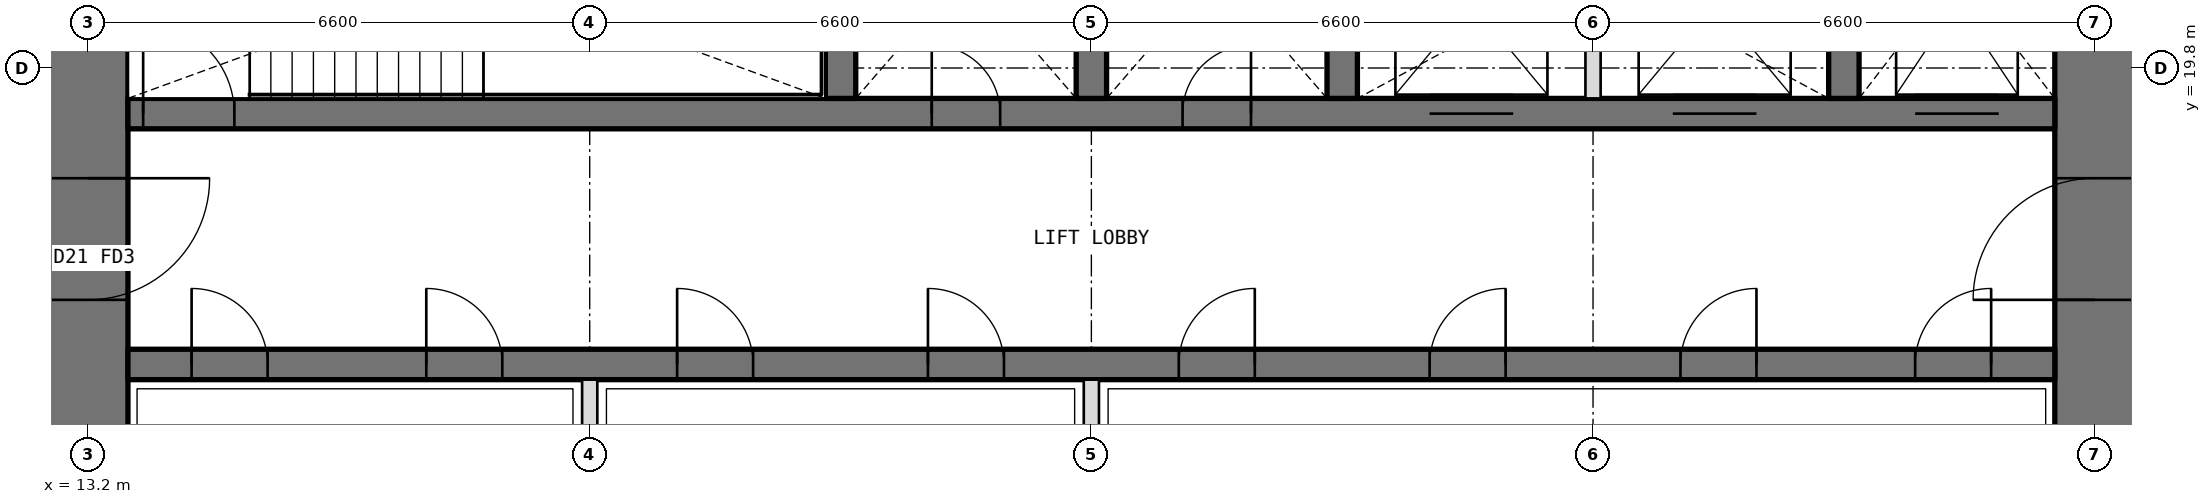
"""IFC4 building model, lengths in metres.
Left out: names, types, materials, properties, quantities, classifications, styles, units other than length and angle.
Written with IfcOpenShell. Run it as: python <this file> out.ifc"""

import sys

from ifc_helpers import new_model, si_unit, direction, frame, frame_2d, origin, place, context, subcontext, project, spatial, rectangle, extrude, element, fill, save


model = new_model("IFC4")
c1 = context("Model", 3, precision=1e-05, world=origin(), true_north=direction((0.0, 1.0)))
c2 = subcontext(c1, "Body", "Model", "MODEL_VIEW")
j1 = project(units=[si_unit("LENGTHUNIT", "METRE"), si_unit("PLANEANGLEUNIT", "RADIAN")], contexts=[c1])
p1 = place(None, origin())
s1 = spatial("IfcSite", under=j1, at=p1, CompositionType="ELEMENT")
p2 = place(p1, origin())
s2 = spatial("IfcBuilding", under=s1, at=p2, CompositionType="ELEMENT")
p3 = place(p2, frame((0.0, 0.0, 283.8)))
s3 = spatial("IfcBuildingStorey", under=s2, at=p3, CompositionType="ELEMENT", Elevation=283.8)
p4 = place(p3, frame((39.6, 13.725, 0.0), z_axis=(0.0, 0.0, 1.0), x_axis=(0.0, 1.0, 0.0)))
e1 = element("IfcWall", 1, at=p4, inside=s3, PredefinedType="SHEAR", context=c2, shape_type="SweptSolid", body=[
    extrude(rectangle(XDim=18.75, YDim=1.05, at=frame_2d((9.375, 0.0))), origin(), (0.0, 0.0, 1.0), 4.2),
])
p5 = place(p4, frame((3.025, 0.0, 0.0)))
e2 = element("IfcOpeningElement", 2, at=p5, cuts=e1, PredefinedType="OPENING", context=c2, shape_type="SweptSolid", body=[
    extrude(rectangle(XDim=1.6, YDim=2.1, at=frame_2d((0.8, 1.05))), frame((0.0, 0.535, 0.0), z_axis=(0.0, -1.0, 0.0), x_axis=(1.0, 0.0, 0.0)), (0.0, 0.0, 1.0), 1.07),
])
p6 = place(p4, frame((13.825, 0.0, 0.0)))
e3 = element("IfcOpeningElement", 3, at=p6, cuts=e1, PredefinedType="OPENING", context=c2, shape_type="SweptSolid", body=[
    extrude(rectangle(XDim=1.6, YDim=2.1, at=frame_2d((0.8, 1.05))), frame((0.0, 0.535, 0.0), z_axis=(0.0, -1.0, 0.0), x_axis=(1.0, 0.0, 0.0)), (0.0, 0.0, 1.0), 1.07),
])
p7 = place(p3, frame((13.2, 32.475, 0.0), z_axis=(0.0, 0.0, 1.0), x_axis=(0.0, -1.0, 0.0)))
e4 = element("IfcWall", 4, at=p7, inside=s3, PredefinedType="SHEAR", context=c2, shape_type="SweptSolid", body=[
    extrude(rectangle(XDim=18.75, YDim=1.05, at=frame_2d((9.375, 0.0))), origin(), (0.0, 0.0, 1.0), 4.2),
])
p8 = place(p7, frame((14.125, 0.0, 0.0)))
e5 = element("IfcOpeningElement", 5, at=p8, cuts=e4, PredefinedType="OPENING", context=c2, shape_type="SweptSolid", body=[
    extrude(rectangle(XDim=1.6, YDim=2.1, at=frame_2d((0.8, 1.05))), frame((0.0, 0.535, 0.0), z_axis=(0.0, -1.0, 0.0), x_axis=(1.0, 0.0, 0.0)), (0.0, 0.0, 1.0), 1.07),
])
p9 = place(p7, frame((3.325, 0.0, 0.0)))
e6 = element("IfcOpeningElement", 6, at=p9, cuts=e4, PredefinedType="OPENING", context=c2, shape_type="SweptSolid", body=[
    extrude(rectangle(XDim=1.6, YDim=2.1, at=frame_2d((0.8, 1.05))), frame((0.0, 0.535, 0.0), z_axis=(0.0, -1.0, 0.0), x_axis=(1.0, 0.0, 0.0)), (0.0, 0.0, 1.0), 1.07),
])
p10 = place(p3, frame((13.725, 15.9, 0.0), z_axis=(0.0, 0.0, 1.0), x_axis=(1.0, 0.0, 0.0)))
e7 = element("IfcWall", 7, at=p10, inside=s3, PredefinedType="SHEAR", context=c2, shape_type="SweptSolid", body=[
    extrude(rectangle(XDim=25.35, YDim=0.4, at=frame_2d((12.675, 0.0))), origin(), (0.0, 0.0, 1.0), 4.2),
])
p11 = place(p10, frame((0.837, 0.0, 0.0)))
e8 = element("IfcOpeningElement", 8, at=p11, cuts=e7, PredefinedType="OPENING", context=c2, shape_type="SweptSolid", body=[
    extrude(rectangle(XDim=1.0, YDim=2.1, at=frame_2d((0.5, 1.05))), frame((0.0, 0.21, 0.0), z_axis=(0.0, -1.0, 0.0), x_axis=(1.0, 0.0, 0.0)), (0.0, 0.0, 1.0), 0.42),
])
p12 = place(p10, frame((3.925, 0.0, 0.0)))
e9 = element("IfcOpeningElement", 9, at=p12, cuts=e7, PredefinedType="OPENING", context=c2, shape_type="SweptSolid", body=[
    extrude(rectangle(XDim=1.0, YDim=2.1, at=frame_2d((0.5, 1.05))), frame((0.0, 0.21, 0.0), z_axis=(0.0, -1.0, 0.0), x_axis=(1.0, 0.0, 0.0)), (0.0, 0.0, 1.0), 0.42),
])
p13 = place(p10, frame((7.225, 0.0, 0.0)))
e10 = element("IfcOpeningElement", 10, at=p13, cuts=e7, PredefinedType="OPENING", context=c2, shape_type="SweptSolid", body=[
    extrude(rectangle(XDim=1.0, YDim=2.1, at=frame_2d((0.5, 1.05))), frame((0.0, 0.21, 0.0), z_axis=(0.0, -1.0, 0.0), x_axis=(1.0, 0.0, 0.0)), (0.0, 0.0, 1.0), 0.42),
])
p14 = place(p10, frame((10.525, 0.0, 0.0)))
e11 = element("IfcOpeningElement", 11, at=p14, cuts=e7, PredefinedType="OPENING", context=c2, shape_type="SweptSolid", body=[
    extrude(rectangle(XDim=1.0, YDim=2.1, at=frame_2d((0.5, 1.05))), frame((0.0, 0.21, 0.0), z_axis=(0.0, -1.0, 0.0), x_axis=(1.0, 0.0, 0.0)), (0.0, 0.0, 1.0), 0.42),
])
p15 = place(p10, frame((13.825, 0.0, 0.0)))
e12 = element("IfcOpeningElement", 12, at=p15, cuts=e7, PredefinedType="OPENING", context=c2, shape_type="SweptSolid", body=[
    extrude(rectangle(XDim=1.0, YDim=2.1, at=frame_2d((0.5, 1.05))), frame((0.0, 0.21, 0.0), z_axis=(0.0, -1.0, 0.0), x_axis=(1.0, 0.0, 0.0)), (0.0, 0.0, 1.0), 0.42),
])
p16 = place(p10, frame((17.125, 0.0, 0.0)))
e13 = element("IfcOpeningElement", 13, at=p16, cuts=e7, PredefinedType="OPENING", context=c2, shape_type="SweptSolid", body=[
    extrude(rectangle(XDim=1.0, YDim=2.1, at=frame_2d((0.5, 1.05))), frame((0.0, 0.21, 0.0), z_axis=(0.0, -1.0, 0.0), x_axis=(1.0, 0.0, 0.0)), (0.0, 0.0, 1.0), 0.42),
])
p17 = place(p10, frame((20.425, 0.0, 0.0)))
e14 = element("IfcOpeningElement", 14, at=p17, cuts=e7, PredefinedType="OPENING", context=c2, shape_type="SweptSolid", body=[
    extrude(rectangle(XDim=1.0, YDim=2.1, at=frame_2d((0.5, 1.05))), frame((0.0, 0.21, 0.0), z_axis=(0.0, -1.0, 0.0), x_axis=(1.0, 0.0, 0.0)), (0.0, 0.0, 1.0), 0.42),
])
p18 = place(p10, frame((23.512, 0.0, 0.0)))
e15 = element("IfcOpeningElement", 15, at=p18, cuts=e7, PredefinedType="OPENING", context=c2, shape_type="SweptSolid", body=[
    extrude(rectangle(XDim=1.0, YDim=2.1, at=frame_2d((0.5, 1.05))), frame((0.0, 0.21, 0.0), z_axis=(0.0, -1.0, 0.0), x_axis=(1.0, 0.0, 0.0)), (0.0, 0.0, 1.0), 0.42),
])
p19 = place(p3, frame((13.725, 19.2, 0.0), z_axis=(0.0, 0.0, 1.0), x_axis=(1.0, 0.0, 0.0)))
e16 = element("IfcWall", 16, at=p19, inside=s3, PredefinedType="SHEAR", context=c2, shape_type="SweptSolid", body=[
    extrude(rectangle(XDim=25.35, YDim=0.4, at=frame_2d((12.675, 0.0))), origin(), (0.0, 0.0, 1.0), 4.2),
])
p20 = place(p19, frame((10.575, 0.0, 0.0)))
e17 = element("IfcOpeningElement", 17, at=p20, cuts=e16, PredefinedType="OPENING", context=c2, shape_type="SweptSolid", body=[
    extrude(rectangle(XDim=0.9, YDim=2.1, at=frame_2d((0.45, 1.05))), frame((0.0, 0.21, 0.0), z_axis=(0.0, -1.0, 0.0), x_axis=(1.0, 0.0, 0.0)), (0.0, 0.0, 1.0), 0.42),
])
p21 = place(p19, frame((13.875, 0.0, 0.0)))
e18 = element("IfcOpeningElement", 18, at=p21, cuts=e16, PredefinedType="OPENING", context=c2, shape_type="SweptSolid", body=[
    extrude(rectangle(XDim=0.9, YDim=2.1, at=frame_2d((0.45, 1.05))), frame((0.0, 0.21, 0.0), z_axis=(0.0, -1.0, 0.0), x_axis=(1.0, 0.0, 0.0)), (0.0, 0.0, 1.0), 0.42),
])
p22 = place(p19, frame((0.2, 0.0, 0.0)))
e19 = element("IfcOpeningElement", 19, at=p22, cuts=e16, PredefinedType="OPENING", context=c2, shape_type="SweptSolid", body=[
    extrude(rectangle(XDim=1.2, YDim=2.1, at=frame_2d((0.6, 1.05))), frame((0.0, 0.21, 0.0), z_axis=(0.0, -1.0, 0.0), x_axis=(1.0, 0.0, 0.0)), (0.0, 0.0, 1.0), 0.42),
])
p23 = place(p19, frame((23.512, 0.0, 0.0)))
e20 = element("IfcOpeningElement", 20, at=p23, cuts=e16, PredefinedType="OPENING", context=c2, shape_type="SweptSolid", body=[
    extrude(rectangle(XDim=1.1, YDim=2.1, at=frame_2d((0.55, 1.05))), frame((0.0, 0.21, 0.0), z_axis=(0.0, -1.0, 0.0), x_axis=(1.0, 0.0, 0.0)), (0.0, 0.0, 1.0), 0.42),
])
p24 = place(p19, frame((17.125, 0.0, 0.0)))
e21 = element("IfcOpeningElement", 21, at=p24, cuts=e16, PredefinedType="OPENING", context=c2, shape_type="SweptSolid", body=[
    extrude(rectangle(XDim=1.1, YDim=2.1, at=frame_2d((0.55, 1.05))), frame((0.0, 0.21, 0.0), z_axis=(0.0, -1.0, 0.0), x_axis=(1.0, 0.0, 0.0)), (0.0, 0.0, 1.0), 0.42),
])
p25 = place(p19, frame((20.325, 0.0, 0.0)))
e22 = element("IfcOpeningElement", 22, at=p25, cuts=e16, PredefinedType="OPENING", context=c2, shape_type="SweptSolid", body=[
    extrude(rectangle(XDim=1.1, YDim=2.1, at=frame_2d((0.55, 1.05))), frame((0.0, 0.21, 0.0), z_axis=(0.0, -1.0, 0.0), x_axis=(1.0, 0.0, 0.0)), (0.0, 0.0, 1.0), 0.42),
])
for number, where, z_axis, x_axis in (
    (23, (23.1, 19.4, 0.0), (0.0, 0.0, 1.0), (0.0, 1.0, 0.0)),
    (24, (26.4, 19.4, 0.0), (0.0, 0.0, 1.0), (0.0, 1.0, 0.0)),
    (25, (29.7, 19.4, 0.0), (0.0, 0.0, 1.0), (0.0, 1.0, 0.0)),
    (26, (36.3, 19.4, 0.0), (0.0, 0.0, 1.0), (0.0, 1.0, 0.0)),
):
    element("IfcWall", number, at=place(p3, frame(where, z_axis=z_axis, x_axis=x_axis)), inside=s3, PredefinedType="SHEAR", context=c2, shape_type="SweptSolid", body=[
        extrude(rectangle(XDim=3.35, YDim=0.4, at=frame_2d((1.675, 0.0))), origin(), (0.0, 0.0, 1.0), 4.2),
    ])
for number, where, z_axis, x_axis in (
    (27, (19.8, 13.725, 0.0), (0.0, 0.0, 1.0), (0.0, 1.0, 0.0)),
    (28, (26.4, 13.725, 0.0), (0.0, 0.0, 1.0), (0.0, 1.0, 0.0)),
):
    element("IfcWall", number, at=place(p3, frame(where, z_axis=z_axis, x_axis=x_axis)), inside=s3, PredefinedType="PARTITIONING", context=c2, shape_type="SweptSolid", body=[
        extrude(rectangle(XDim=1.975, YDim=0.2, at=frame_2d((0.987, 0.0))), origin(), (0.0, 0.0, 1.0), 4.2),
    ])
p26 = place(p3, frame((33.0, 19.4, 0.0), z_axis=(0.0, 0.0, 1.0), x_axis=(0.0, 1.0, 0.0)))
e29 = element("IfcWall", 29, at=p26, inside=s3, PredefinedType="PARTITIONING", context=c2, shape_type="SweptSolid", body=[
    extrude(rectangle(XDim=3.35, YDim=0.2, at=frame_2d((1.675, 0.0))), origin(), (0.0, 0.0, 1.0), 4.2),
])
p27 = place(p20, origin())
e30 = element("IfcDoor", 30, at=p27, inside=s3, OperationType="SINGLE_SWING_LEFT", PredefinedType="DOOR", context=c2, shape_type="SweptSolid", body=[
    extrude(rectangle(XDim=0.9, YDim=2.1, at=frame_2d((0.45, 1.05))), frame((0.0, 0.025, 0.0), z_axis=(0.0, -1.0, 0.0), x_axis=(1.0, 0.0, 0.0)), (0.0, 0.0, 1.0), 0.05),
])
fill(e17, e30)
p28 = place(p21, origin())
e31 = element("IfcDoor", 31, at=p28, inside=s3, OperationType="SINGLE_SWING_RIGHT", PredefinedType="DOOR", context=c2, shape_type="SweptSolid", body=[
    extrude(rectangle(XDim=0.9, YDim=2.1, at=frame_2d((0.45, 1.05))), frame((0.0, 0.025, 0.0), z_axis=(0.0, -1.0, 0.0), x_axis=(1.0, 0.0, 0.0)), (0.0, 0.0, 1.0), 0.05),
])
fill(e18, e31)
p29 = place(p11, origin())
e32 = element("IfcDoor", 32, at=p29, inside=s3, OperationType="SINGLE_SWING_LEFT", PredefinedType="DOOR", context=c2, shape_type="SweptSolid", body=[
    extrude(rectangle(XDim=1.0, YDim=2.1, at=frame_2d((0.5, 1.05))), frame((0.0, 0.025, 0.0), z_axis=(0.0, -1.0, 0.0), x_axis=(1.0, 0.0, 0.0)), (0.0, 0.0, 1.0), 0.05),
])
fill(e8, e32)
p30 = place(p12, origin())
e33 = element("IfcDoor", 33, at=p30, inside=s3, OperationType="SINGLE_SWING_LEFT", PredefinedType="DOOR", context=c2, shape_type="SweptSolid", body=[
    extrude(rectangle(XDim=1.0, YDim=2.1, at=frame_2d((0.5, 1.05))), frame((0.0, 0.025, 0.0), z_axis=(0.0, -1.0, 0.0), x_axis=(1.0, 0.0, 0.0)), (0.0, 0.0, 1.0), 0.05),
])
fill(e9, e33)
p31 = place(p13, origin())
e34 = element("IfcDoor", 34, at=p31, inside=s3, OperationType="SINGLE_SWING_LEFT", PredefinedType="DOOR", context=c2, shape_type="SweptSolid", body=[
    extrude(rectangle(XDim=1.0, YDim=2.1, at=frame_2d((0.5, 1.05))), frame((0.0, 0.025, 0.0), z_axis=(0.0, -1.0, 0.0), x_axis=(1.0, 0.0, 0.0)), (0.0, 0.0, 1.0), 0.05),
])
fill(e10, e34)
p32 = place(p14, origin())
e35 = element("IfcDoor", 35, at=p32, inside=s3, OperationType="SINGLE_SWING_LEFT", PredefinedType="DOOR", context=c2, shape_type="SweptSolid", body=[
    extrude(rectangle(XDim=1.0, YDim=2.1, at=frame_2d((0.5, 1.05))), frame((0.0, 0.025, 0.0), z_axis=(0.0, -1.0, 0.0), x_axis=(1.0, 0.0, 0.0)), (0.0, 0.0, 1.0), 0.05),
])
fill(e11, e35)
p33 = place(p15, origin())
e36 = element("IfcDoor", 36, at=p33, inside=s3, OperationType="SINGLE_SWING_RIGHT", PredefinedType="DOOR", context=c2, shape_type="SweptSolid", body=[
    extrude(rectangle(XDim=1.0, YDim=2.1, at=frame_2d((0.5, 1.05))), frame((0.0, 0.025, 0.0), z_axis=(0.0, -1.0, 0.0), x_axis=(1.0, 0.0, 0.0)), (0.0, 0.0, 1.0), 0.05),
])
fill(e12, e36)
p34 = place(p16, origin())
e37 = element("IfcDoor", 37, at=p34, inside=s3, OperationType="SINGLE_SWING_RIGHT", PredefinedType="DOOR", context=c2, shape_type="SweptSolid", body=[
    extrude(rectangle(XDim=1.0, YDim=2.1, at=frame_2d((0.5, 1.05))), frame((0.0, 0.025, 0.0), z_axis=(0.0, -1.0, 0.0), x_axis=(1.0, 0.0, 0.0)), (0.0, 0.0, 1.0), 0.05),
])
fill(e13, e37)
p35 = place(p17, origin())
e38 = element("IfcDoor", 38, at=p35, inside=s3, OperationType="SINGLE_SWING_RIGHT", PredefinedType="DOOR", context=c2, shape_type="SweptSolid", body=[
    extrude(rectangle(XDim=1.0, YDim=2.1, at=frame_2d((0.5, 1.05))), frame((0.0, 0.025, 0.0), z_axis=(0.0, -1.0, 0.0), x_axis=(1.0, 0.0, 0.0)), (0.0, 0.0, 1.0), 0.05),
])
fill(e14, e38)
p36 = place(p18, origin())
e39 = element("IfcDoor", 39, at=p36, inside=s3, OperationType="SINGLE_SWING_RIGHT", PredefinedType="DOOR", context=c2, shape_type="SweptSolid", body=[
    extrude(rectangle(XDim=1.0, YDim=2.1, at=frame_2d((0.5, 1.05))), frame((0.0, 0.025, 0.0), z_axis=(0.0, -1.0, 0.0), x_axis=(1.0, 0.0, 0.0)), (0.0, 0.0, 1.0), 0.05),
])
fill(e15, e39)
p37 = place(p22, origin())
e40 = element("IfcDoor", 40, at=p37, inside=s3, OperationType="SINGLE_SWING_LEFT", PredefinedType="DOOR", context=c2, shape_type="SweptSolid", body=[
    extrude(rectangle(XDim=1.2, YDim=2.1, at=frame_2d((0.6, 1.05))), frame((0.0, 0.025, 0.0), z_axis=(0.0, -1.0, 0.0), x_axis=(1.0, 0.0, 0.0)), (0.0, 0.0, 1.0), 0.05),
])
fill(e19, e40)
p38 = place(p8, origin())
e41 = element("IfcDoor", 41, at=p38, inside=s3, OperationType="DOUBLE_DOOR_DOUBLE_SWING", PredefinedType="DOOR", context=c2, shape_type="SweptSolid", body=[
    extrude(rectangle(XDim=1.6, YDim=2.1, at=frame_2d((0.8, 1.05))), frame((0.0, 0.025, 0.0), z_axis=(0.0, -1.0, 0.0), x_axis=(1.0, 0.0, 0.0)), (0.0, 0.0, 1.0), 0.05),
])
fill(e5, e41)
p39 = place(p5, origin())
e42 = element("IfcDoor", 42, at=p39, inside=s3, OperationType="DOUBLE_DOOR_DOUBLE_SWING", PredefinedType="DOOR", context=c2, shape_type="SweptSolid", body=[
    extrude(rectangle(XDim=1.6, YDim=2.1, at=frame_2d((0.8, 1.05))), frame((0.0, 0.025, 0.0), z_axis=(0.0, -1.0, 0.0), x_axis=(1.0, 0.0, 0.0)), (0.0, 0.0, 1.0), 0.05),
])
fill(e2, e42)
p40 = place(p23, origin())
e43 = element("IfcDoor", 43, at=p40, inside=s3, OperationType="DOUBLE_DOOR_SLIDING", PredefinedType="DOOR", context=c2, shape_type="SweptSolid", body=[
    extrude(rectangle(XDim=1.1, YDim=2.1, at=frame_2d((0.55, 1.05))), frame((0.0, 0.025, 0.0), z_axis=(0.0, -1.0, 0.0), x_axis=(1.0, 0.0, 0.0)), (0.0, 0.0, 1.0), 0.05),
])
fill(e20, e43)
p41 = place(p24, origin())
e44 = element("IfcDoor", 44, at=p41, inside=s3, OperationType="DOUBLE_DOOR_SLIDING", PredefinedType="DOOR", context=c2, shape_type="SweptSolid", body=[
    extrude(rectangle(XDim=1.1, YDim=2.1, at=frame_2d((0.55, 1.05))), frame((0.0, 0.025, 0.0), z_axis=(0.0, -1.0, 0.0), x_axis=(1.0, 0.0, 0.0)), (0.0, 0.0, 1.0), 0.05),
])
fill(e21, e44)
p42 = place(p25, origin())
e45 = element("IfcDoor", 45, at=p42, inside=s3, OperationType="DOUBLE_DOOR_SLIDING", PredefinedType="DOOR", context=c2, shape_type="SweptSolid", body=[
    extrude(rectangle(XDim=1.1, YDim=2.1, at=frame_2d((0.55, 1.05))), frame((0.0, 0.025, 0.0), z_axis=(0.0, -1.0, 0.0), x_axis=(1.0, 0.0, 0.0)), (0.0, 0.0, 1.0), 0.05),
])
fill(e22, e45)
save(model, sys.argv[1])
